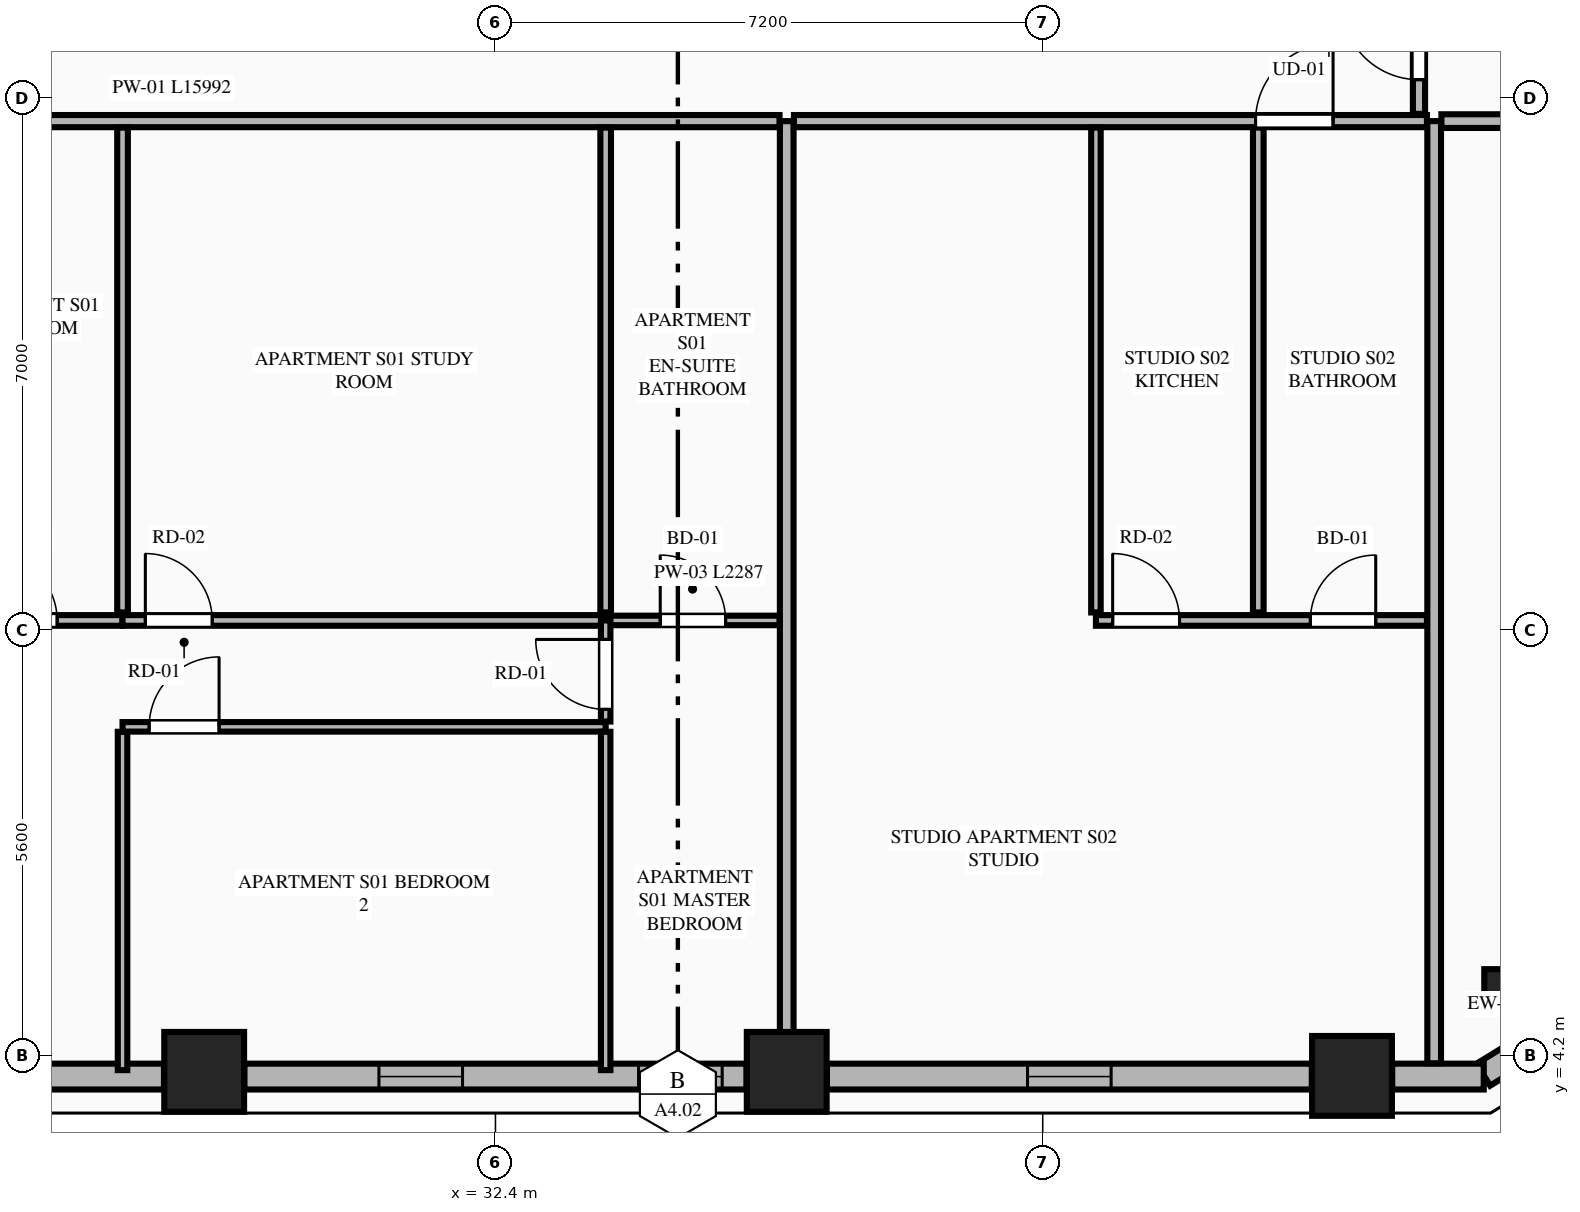
"""IFC4 building model, lengths in metres.
Left out: names, types, materials, properties, quantities, classifications, styles, units other than length and angle.
Written with IfcOpenShell. Run it as: python <this file> out.ifc"""

import sys

from ifc_helpers import new_model, si_unit, direction, frame, frame_2d, origin, origin_2d, place, context, subcontext, project, spatial, rectangle, extrude, element, fill, save


model = new_model("IFC4")
c1 = context("Model", 3, precision=1e-05, world=origin(), true_north=direction((0.0, 1.0)))
c2 = subcontext(c1, "Body", "Model", "MODEL_VIEW")
j1 = project(units=[si_unit("LENGTHUNIT", "METRE"), si_unit("PLANEANGLEUNIT", "RADIAN")], contexts=[c1])
p1 = place(None, origin())
s1 = spatial("IfcSite", under=j1, at=p1, CompositionType="ELEMENT")
p2 = place(p1, origin())
s2 = spatial("IfcBuilding", under=s1, at=p2, CompositionType="ELEMENT")
p3 = place(p2, frame((0.0, 0.0, 101.95)))
s3 = spatial("IfcBuildingStorey", under=s2, at=p3, CompositionType="ELEMENT", Elevation=101.95)
for number, where, z_axis, x_axis in (
    (1, (28.568, 3.992, 0.0), (0.0, 0.0, 1.0), (1.0, 0.0, 0.0)),
    (2, (36.232, 3.992, 0.0), (0.0, 0.0, 1.0), (1.0, 0.0, 0.0)),
    (3, (43.669, 3.939, 0.0), (0.0, 0.0, 1.0), (1.0, 0.0, 0.0)),
):
    element("IfcColumn", number, at=place(p3, frame(where, z_axis=z_axis, x_axis=x_axis)), inside=s3, PredefinedType="COLUMN", context=c2, shape_type="SweptSolid", body=[
        extrude(rectangle(XDim=1.05, YDim=1.05, at=origin_2d()), origin(), (0.0, 0.0, 1.0), 3.55),
    ])
p4 = place(p3, frame((45.659, 5.093, 0.0), z_axis=(0.0, 0.0, 1.0), x_axis=(0.865160173452, 0.501495637342, 0.0)))
e4 = element("IfcColumn", 4, at=p4, inside=s3, PredefinedType="PILASTER", context=c2, shape_type="SweptSolid", body=[
    extrude(rectangle(XDim=0.5, YDim=0.35, at=origin_2d()), origin(), (0.0, 0.0, 1.0), 3.55),
])
p5 = place(p3, frame((45.397, 3.955, 0.0), z_axis=(0.0, 0.0, 1.0), x_axis=(0.851798915137, 0.523868884523, 0.0)))
e5 = element("IfcWall", 5, at=p5, inside=s3, PredefinedType="STANDARD", context=c2, shape_type="SweptSolid", body=[
    extrude(rectangle(XDim=1.848, YDim=0.34, at=frame_2d((0.924, 0.0))), origin(), (0.0, 0.0, 1.0), 3.34),
])
p6 = place(p3, frame((21.66, 3.93, 0.0), z_axis=(0.0, 0.0, 1.0), x_axis=(1.0, 0.0, 0.0)))
e6 = element("IfcWall", 6, at=p6, inside=s3, PredefinedType="STANDARD", context=c2, shape_type="SweptSolid", body=[
    extrude(rectangle(XDim=6.379, YDim=0.34, at=frame_2d((3.189, 0.0))), origin(), (0.0, 0.0, 1.0), 2.797),
])
p7 = place(p6, frame((2.64, 0.0, 0.75)))
e7 = element("IfcOpeningElement", 7, at=p7, cuts=e6, PredefinedType="OPENING", context=c2, shape_type="SweptSolid", body=[
    extrude(rectangle(XDim=1.1, YDim=1.897, at=frame_2d((0.55, 0.948))), frame((0.0, 0.18, 0.0), z_axis=(0.0, -1.0, 0.0), x_axis=(1.0, 0.0, 0.0)), (0.0, 0.0, 1.0), 0.36),
])
p8 = place(p3, frame((29.097, 3.93, 0.0), z_axis=(0.0, 0.0, 1.0), x_axis=(1.0, 0.0, 0.0)))
e8 = element("IfcWall", 8, at=p8, inside=s3, PredefinedType="STANDARD", context=c2, shape_type="SweptSolid", body=[
    extrude(rectangle(XDim=6.606, YDim=0.34, at=frame_2d((3.303, 0.0))), origin(), (0.0, 0.0, 1.0), 2.797),
])
p9 = place(p8, frame((1.77, 0.0, 0.75)))
e9 = element("IfcOpeningElement", 9, at=p9, cuts=e8, PredefinedType="OPENING", context=c2, shape_type="SweptSolid", body=[
    extrude(rectangle(XDim=1.1, YDim=1.897, at=frame_2d((0.55, 0.948))), frame((0.0, 0.18, 0.0), z_axis=(0.0, -1.0, 0.0), x_axis=(1.0, 0.0, 0.0)), (0.0, 0.0, 1.0), 0.36),
])
p10 = place(p8, frame((5.186, 0.0, 0.75)))
e10 = element("IfcOpeningElement", 10, at=p10, cuts=e8, PredefinedType="OPENING", context=c2, shape_type="SweptSolid", body=[
    extrude(rectangle(XDim=1.1, YDim=1.897, at=frame_2d((0.55, 0.948))), frame((0.0, 0.18, 0.0), z_axis=(0.0, -1.0, 0.0), x_axis=(1.0, 0.0, 0.0)), (0.0, 0.0, 1.0), 0.36),
])
p11 = place(p3, frame((36.761, 3.93, 0.0), z_axis=(0.0, 0.0, 1.0), x_axis=(1.0, 0.0, 0.0)))
e11 = element("IfcWall", 11, at=p11, inside=s3, PredefinedType="STANDARD", context=c2, shape_type="SweptSolid", body=[
    extrude(rectangle(XDim=6.379, YDim=0.34, at=frame_2d((3.189, 0.0))), origin(), (0.0, 0.0, 1.0), 2.797),
])
p12 = place(p11, frame((2.639, 0.0, 0.75)))
e12 = element("IfcOpeningElement", 12, at=p12, cuts=e11, PredefinedType="OPENING", context=c2, shape_type="SweptSolid", body=[
    extrude(rectangle(XDim=1.1, YDim=1.897, at=frame_2d((0.55, 0.948))), frame((0.0, 0.18, 0.0), z_axis=(0.0, -1.0, 0.0), x_axis=(1.0, 0.0, 0.0)), (0.0, 0.0, 1.0), 0.36),
])
p13 = place(p3, frame((44.198, 3.93, 0.0), z_axis=(0.0, 0.0, 1.0), x_axis=(1.0, 0.0, 0.0)))
e13 = element("IfcWall", 13, at=p13, inside=s3, PredefinedType="STANDARD", context=c2, shape_type="SweptSolid", body=[
    extrude(rectangle(XDim=1.204, YDim=0.34, at=frame_2d((0.602, 0.0))), origin(), (0.0, 0.0, 1.0), 3.34),
])
p14 = place(p3, frame((36.232, 4.105, 0.0), z_axis=(0.0, 0.0, 1.0), x_axis=(0.0, 1.0, 0.0)))
e14 = element("IfcWall", 14, at=p14, inside=s3, PredefinedType="PARTITIONING", context=c2, shape_type="SweptSolid", body=[
    extrude(rectangle(XDim=12.395, YDim=0.18, at=frame_2d((6.198, 0.0))), origin(), (0.0, 0.0, 1.0), 2.722),
])
p15 = place(p3, frame((44.75, 4.105, 0.0), z_axis=(0.0, 0.0, 1.0), x_axis=(0.0, 1.0, 0.0)))
e15 = element("IfcWall", 15, at=p15, inside=s3, PredefinedType="PARTITIONING", context=c2, shape_type="SweptSolid", body=[
    extrude(rectangle(XDim=12.395, YDim=0.18, at=frame_2d((6.198, 0.0))), origin(), (0.0, 0.0, 1.0), 3.34),
])
p16 = place(p3, frame((20.145, 16.5, 0.0), z_axis=(0.0, 0.0, 1.0), x_axis=(1.0, 0.0, 0.0)))
e16 = element("IfcWall", 16, at=p16, inside=s3, PredefinedType="PARTITIONING", context=c2, shape_type="SweptSolid", body=[
    extrude(rectangle(XDim=15.992, YDim=0.16, at=frame_2d((7.996, 0.0))), origin(), (0.0, 0.0, 1.0), 3.34),
])
p17 = place(p16, frame((0.405, 0.0, 0.0)))
e17 = element("IfcOpeningElement", 17, at=p17, cuts=e16, PredefinedType="OPENING", context=c2, shape_type="SweptSolid", body=[
    extrude(rectangle(XDim=1.35, YDim=2.35, at=frame_2d((0.675, 1.175))), frame((0.0, 0.09, 0.0), z_axis=(0.0, -1.0, 0.0), x_axis=(1.0, 0.0, 0.0)), (0.0, 0.0, 1.0), 0.18),
])
p18 = place(p3, frame((22.1, 9.931, 0.0), z_axis=(0.0, 0.0, 1.0), x_axis=(1.0, 0.0, 0.0)))
e18 = element("IfcWall", 18, at=p18, inside=s3, PredefinedType="PLUMBINGWALL", context=c2, shape_type="SweptSolid", body=[
    extrude(rectangle(XDim=5.394, YDim=0.14, at=frame_2d((2.697, 0.0))), origin(), (0.0, 0.0, 1.0), 3.34),
])
p19 = place(p18, frame((3.674, 0.0, 0.0)))
e19 = element("IfcOpeningElement", 19, at=p19, cuts=e18, PredefinedType="OPENING", context=c2, shape_type="SweptSolid", body=[
    extrude(rectangle(XDim=0.86, YDim=2.1, at=frame_2d((0.43, 1.05))), frame((0.0, 0.08, 0.0), z_axis=(0.0, -1.0, 0.0), x_axis=(1.0, 0.0, 0.0)), (0.0, 0.0, 1.0), 0.16),
])
p20 = place(p18, frame((0.26, 0.0, 0.0)))
e20 = element("IfcOpeningElement", 20, at=p20, cuts=e18, PredefinedType="OPENING", context=c2, shape_type="SweptSolid", body=[
    extrude(rectangle(XDim=0.88, YDim=2.15, at=frame_2d((0.44, 1.075))), frame((0.0, 0.08, 0.0), z_axis=(0.0, -1.0, 0.0), x_axis=(1.0, 0.0, 0.0)), (0.0, 0.0, 1.0), 0.16),
])
p21 = place(p3, frame((27.494, 9.931, 0.0), z_axis=(0.0, 0.0, 1.0), x_axis=(1.0, 0.0, 0.0)))
e21 = element("IfcWall", 21, at=p21, inside=s3, PredefinedType="PLUMBINGWALL", context=c2, shape_type="SweptSolid", body=[
    extrude(rectangle(XDim=6.356, YDim=0.14, at=frame_2d((3.178, 0.0))), origin(), (0.0, 0.0, 1.0), 3.34),
])
p22 = place(p21, frame((0.3, 0.0, 0.0)))
e22 = element("IfcOpeningElement", 22, at=p22, cuts=e21, PredefinedType="OPENING", context=c2, shape_type="SweptSolid", body=[
    extrude(rectangle(XDim=0.88, YDim=2.15, at=frame_2d((0.44, 1.075))), frame((0.0, 0.08, 0.0), z_axis=(0.0, -1.0, 0.0), x_axis=(1.0, 0.0, 0.0)), (0.0, 0.0, 1.0), 0.16),
])
p23 = place(p3, frame((33.85, 9.931, 0.0), z_axis=(0.0, 0.0, 1.0), x_axis=(1.0, 0.0, 0.0)))
e23 = element("IfcWall", 23, at=p23, inside=s3, PredefinedType="PARTITIONING", context=c2, shape_type="SweptSolid", body=[
    extrude(rectangle(XDim=2.287, YDim=0.125, at=frame_2d((1.144, 0.0))), origin(), (0.0, 0.0, 1.0), 3.34),
])
p24 = place(p23, frame((0.718, 0.0, 0.0)))
e24 = element("IfcOpeningElement", 24, at=p24, cuts=e23, PredefinedType="OPENING", context=c2, shape_type="SweptSolid", body=[
    extrude(rectangle(XDim=0.86, YDim=2.1, at=frame_2d((0.43, 1.05))), frame((0.0, 0.073, 0.0), z_axis=(0.0, -1.0, 0.0), x_axis=(1.0, 0.0, 0.0)), (0.0, 0.0, 1.0), 0.145),
])
p25 = place(p3, frame((27.494, 4.015, 0.0), z_axis=(0.0, 0.0, 1.0), x_axis=(0.0, 1.0, 0.0)))
e25 = element("IfcWall", 25, at=p25, inside=s3, PredefinedType="PARTITIONING", context=c2, shape_type="SweptSolid", body=[
    extrude(rectangle(XDim=4.451, YDim=0.125, at=frame_2d((2.226, 0.0))), origin(), (0.0, 0.0, 1.0), 3.34),
])
p26 = place(p3, frame((27.494, 8.531, 0.0), z_axis=(0.0, 0.0, 1.0), x_axis=(1.0, 0.0, 0.0)))
e26 = element("IfcWall", 26, at=p26, inside=s3, PredefinedType="PARTITIONING", context=c2, shape_type="SweptSolid", body=[
    extrude(rectangle(XDim=6.356, YDim=0.125, at=frame_2d((3.178, 0.0))), origin(), (0.0, 0.0, 1.0), 3.34),
])
p27 = place(p26, frame((0.35, 0.0, 0.0)))
e27 = element("IfcOpeningElement", 27, at=p27, cuts=e26, PredefinedType="OPENING", context=c2, shape_type="SweptSolid", body=[
    extrude(rectangle(XDim=0.92, YDim=2.15, at=frame_2d((0.46, 1.075))), frame((0.0, 0.073, 0.0), z_axis=(0.0, -1.0, 0.0), x_axis=(1.0, 0.0, 0.0)), (0.0, 0.0, 1.0), 0.145),
])
p28 = place(p3, frame((33.85, 8.601, 0.0), z_axis=(0.0, 0.0, 1.0), x_axis=(0.0, 1.0, 0.0)))
e28 = element("IfcWall", 28, at=p28, inside=s3, PredefinedType="PARTITIONING", context=c2, shape_type="SweptSolid", body=[
    extrude(rectangle(XDim=1.33, YDim=0.125, at=frame_2d((0.665, 0.0))), origin(), (0.0, 0.0, 1.0), 3.34),
])
p29 = place(p28, frame((0.16, 0.0, 0.0)))
e29 = element("IfcOpeningElement", 29, at=p29, cuts=e28, PredefinedType="OPENING", context=c2, shape_type="SweptSolid", body=[
    extrude(rectangle(XDim=0.92, YDim=2.15, at=frame_2d((0.46, 1.075))), frame((0.0, 0.073, 0.0), z_axis=(0.0, -1.0, 0.0), x_axis=(1.0, 0.0, 0.0)), (0.0, 0.0, 1.0), 0.145),
])
for number, where, z_axis, x_axis in (
    (30, (27.494, 10.036, 0.0), (0.0, 0.0, 1.0), (0.0, 1.0, 0.0)),
    (31, (33.85, 10.036, 0.0), (0.0, 0.0, 1.0), (0.0, 1.0, 0.0)),
):
    element("IfcWall", number, at=place(p3, frame(where, z_axis=z_axis, x_axis=x_axis)), inside=s3, PredefinedType="PLUMBINGWALL", context=c2, shape_type="SweptSolid", body=[
        extrude(rectangle(XDim=6.379, YDim=0.14, at=frame_2d((3.189, 0.0))), origin(), (0.0, 0.0, 1.0), 3.34),
    ])
p30 = place(p3, frame((33.85, 4.015, 0.0), z_axis=(0.0, 0.0, 1.0), x_axis=(0.0, 1.0, 0.0)))
e32 = element("IfcWall", 32, at=p30, inside=s3, PredefinedType="PARTITIONING", context=c2, shape_type="SweptSolid", body=[
    extrude(rectangle(XDim=4.451, YDim=0.125, at=frame_2d((2.226, 0.0))), origin(), (0.0, 0.0, 1.0), 3.34),
])
p31 = place(p3, frame((36.327, 16.5, 0.0), z_axis=(0.0, 0.0, 1.0), x_axis=(1.0, 0.0, 0.0)))
e33 = element("IfcWall", 33, at=p31, inside=s3, PredefinedType="PARTITIONING", context=c2, shape_type="SweptSolid", body=[
    extrude(rectangle(XDim=8.328, YDim=0.16, at=frame_2d((4.164, 0.0))), origin(), (0.0, 0.0, 1.0), 3.34),
])
p32 = place(p31, frame((6.073, 0.0, 0.0)))
e34 = element("IfcOpeningElement", 34, at=p32, cuts=e33, PredefinedType="OPENING", context=c2, shape_type="SweptSolid", body=[
    extrude(rectangle(XDim=1.02, YDim=2.25, at=frame_2d((0.51, 1.125))), frame((0.0, 0.09, 0.0), z_axis=(0.0, -1.0, 0.0), x_axis=(1.0, 0.0, 0.0)), (0.0, 0.0, 1.0), 0.18),
])
p33 = place(p3, frame((40.3, 10.036, 0.0), z_axis=(0.0, 0.0, 1.0), x_axis=(0.0, 1.0, 0.0)))
e35 = element("IfcWall", 35, at=p33, inside=s3, PredefinedType="PARTITIONING", context=c2, shape_type="SweptSolid", body=[
    extrude(rectangle(XDim=6.379, YDim=0.125, at=frame_2d((3.189, 0.0))), origin(), (0.0, 0.0, 1.0), 3.34),
])
p34 = place(p3, frame((40.3, 9.931, 0.0), z_axis=(0.0, 0.0, 1.0), x_axis=(1.0, 0.0, 0.0)))
e36 = element("IfcWall", 36, at=p34, inside=s3, PredefinedType="PLUMBINGWALL", context=c2, shape_type="SweptSolid", body=[
    extrude(rectangle(XDim=4.355, YDim=0.14, at=frame_2d((2.177, 0.0))), origin(), (0.0, 0.0, 1.0), 3.34),
])
p35 = place(p34, frame((2.821, 0.0, 0.0)))
e37 = element("IfcOpeningElement", 37, at=p35, cuts=e36, PredefinedType="OPENING", context=c2, shape_type="SweptSolid", body=[
    extrude(rectangle(XDim=0.86, YDim=2.1, at=frame_2d((0.43, 1.05))), frame((0.0, 0.08, 0.0), z_axis=(0.0, -1.0, 0.0), x_axis=(1.0, 0.0, 0.0)), (0.0, 0.0, 1.0), 0.16),
])
p36 = place(p34, frame((0.22, 0.0, 0.0)))
e38 = element("IfcOpeningElement", 38, at=p36, cuts=e36, PredefinedType="OPENING", context=c2, shape_type="SweptSolid", body=[
    extrude(rectangle(XDim=0.88, YDim=2.15, at=frame_2d((0.44, 1.075))), frame((0.0, 0.08, 0.0), z_axis=(0.0, -1.0, 0.0), x_axis=(1.0, 0.0, 0.0)), (0.0, 0.0, 1.0), 0.16),
])
p37 = place(p3, frame((42.436, 10.036, 0.0), z_axis=(0.0, 0.0, 1.0), x_axis=(0.0, 1.0, 0.0)))
e39 = element("IfcWall", 39, at=p37, inside=s3, PredefinedType="PLUMBINGWALL", context=c2, shape_type="SweptSolid", body=[
    extrude(rectangle(XDim=6.379, YDim=0.14, at=frame_2d((3.189, 0.0))), origin(), (0.0, 0.0, 1.0), 2.722),
])
p38 = place(p3, frame((44.845, 16.5, 0.0), z_axis=(0.0, 0.0, 1.0), x_axis=(1.0, 0.0, 0.0)))
e40 = element("IfcWall", 40, at=p38, inside=s3, PredefinedType="PARTITIONING", context=c2, shape_type="SweptSolid", body=[
    extrude(rectangle(XDim=7.77, YDim=0.18, at=frame_2d((3.885, 0.0))), origin(), (0.0, 0.0, 1.0), 3.34),
])
p39 = place(p3, frame((44.55, 16.595, 0.0), z_axis=(0.0, 0.0, 1.0), x_axis=(0.0, 1.0, 0.0)))
e41 = element("IfcWall", 41, at=p39, inside=s3, PredefinedType="PARTITIONING", context=c2, shape_type="SweptSolid", body=[
    extrude(rectangle(XDim=9.586, YDim=0.16, at=frame_2d((4.793, 0.0))), origin(), (0.0, 0.0, 1.0), 3.34),
])
p40 = place(p39, frame((0.45, 0.0, 0.0)))
e42 = element("IfcOpeningElement", 42, at=p40, cuts=e41, PredefinedType="OPENING", context=c2, shape_type="SweptSolid", body=[
    extrude(rectangle(XDim=1.02, YDim=2.25, at=frame_2d((0.51, 1.125))), frame((0.0, 0.09, 0.0), z_axis=(0.0, -1.0, 0.0), x_axis=(1.0, 0.0, 0.0)), (0.0, 0.0, 1.0), 0.18),
])
p41 = place(p9, origin())
e43 = element("IfcWindow", 43, at=p41, inside=s3, PartitioningType="SINGLE_PANEL", PredefinedType="WINDOW", context=c2, shape_type="SweptSolid", body=[
    extrude(rectangle(XDim=1.1, YDim=1.897, at=frame_2d((0.55, 0.948))), frame((0.0, 0.03, 0.0), z_axis=(0.0, -1.0, 0.0), x_axis=(1.0, 0.0, 0.0)), (0.0, 0.0, 1.0), 0.06),
])
fill(e9, e43)
p42 = place(p12, origin())
e44 = element("IfcWindow", 44, at=p42, inside=s3, PartitioningType="SINGLE_PANEL", PredefinedType="WINDOW", context=c2, shape_type="SweptSolid", body=[
    extrude(rectangle(XDim=1.1, YDim=1.897, at=frame_2d((0.55, 0.948))), frame((0.0, 0.03, 0.0), z_axis=(0.0, -1.0, 0.0), x_axis=(1.0, 0.0, 0.0)), (0.0, 0.0, 1.0), 0.06),
])
fill(e12, e44)
p43 = place(p19, origin())
e45 = element("IfcDoor", 45, at=p43, inside=s3, OperationType="SINGLE_SWING_LEFT", PredefinedType="DOOR", context=c2, shape_type="SweptSolid", body=[
    extrude(rectangle(XDim=0.86, YDim=2.1, at=frame_2d((0.43, 1.05))), frame((0.0, 0.025, 0.0), z_axis=(0.0, -1.0, 0.0), x_axis=(1.0, 0.0, 0.0)), (0.0, 0.0, 1.0), 0.05),
])
fill(e19, e45)
p44 = place(p24, origin())
e46 = element("IfcDoor", 46, at=p44, inside=s3, OperationType="SINGLE_SWING_LEFT", PredefinedType="DOOR", context=c2, shape_type="SweptSolid", body=[
    extrude(rectangle(XDim=0.86, YDim=2.1, at=frame_2d((0.43, 1.05))), frame((0.0, 0.025, 0.0), z_axis=(0.0, -1.0, 0.0), x_axis=(1.0, 0.0, 0.0)), (0.0, 0.0, 1.0), 0.05),
])
fill(e24, e46)
p45 = place(p22, origin())
e47 = element("IfcDoor", 47, at=p45, inside=s3, OperationType="SINGLE_SWING_LEFT", PredefinedType="DOOR", context=c2, shape_type="SweptSolid", body=[
    extrude(rectangle(XDim=0.88, YDim=2.15, at=frame_2d((0.44, 1.075))), frame((0.0, 0.025, 0.0), z_axis=(0.0, -1.0, 0.0), x_axis=(1.0, 0.0, 0.0)), (0.0, 0.0, 1.0), 0.05),
])
fill(e22, e47)
p46 = place(p27, origin())
e48 = element("IfcDoor", 48, at=p46, inside=s3, OperationType="SINGLE_SWING_RIGHT", PredefinedType="DOOR", context=c2, shape_type="SweptSolid", body=[
    extrude(rectangle(XDim=0.92, YDim=2.15, at=frame_2d((0.46, 1.075))), frame((0.0, 0.025, 0.0), z_axis=(0.0, -1.0, 0.0), x_axis=(1.0, 0.0, 0.0)), (0.0, 0.0, 1.0), 0.05),
])
fill(e27, e48)
p47 = place(p29, origin())
e49 = element("IfcDoor", 49, at=p47, inside=s3, OperationType="SINGLE_SWING_RIGHT", PredefinedType="DOOR", context=c2, shape_type="SweptSolid", body=[
    extrude(rectangle(XDim=0.92, YDim=2.15, at=frame_2d((0.46, 1.075))), frame((0.0, 0.025, 0.0), z_axis=(0.0, -1.0, 0.0), x_axis=(1.0, 0.0, 0.0)), (0.0, 0.0, 1.0), 0.05),
])
fill(e29, e49)
p48 = place(p35, origin())
e50 = element("IfcDoor", 50, at=p48, inside=s3, OperationType="SINGLE_SWING_RIGHT", PredefinedType="DOOR", context=c2, shape_type="SweptSolid", body=[
    extrude(rectangle(XDim=0.86, YDim=2.1, at=frame_2d((0.43, 1.05))), frame((0.0, 0.025, 0.0), z_axis=(0.0, -1.0, 0.0), x_axis=(1.0, 0.0, 0.0)), (0.0, 0.0, 1.0), 0.05),
])
fill(e37, e50)
p49 = place(p32, origin())
e51 = element("IfcDoor", 51, at=p49, inside=s3, OperationType="SINGLE_SWING_RIGHT", PredefinedType="DOOR", context=c2, shape_type="SweptSolid", body=[
    extrude(rectangle(XDim=1.02, YDim=2.25, at=frame_2d((0.51, 1.125))), frame((0.0, 0.025, 0.0), z_axis=(0.0, -1.0, 0.0), x_axis=(1.0, 0.0, 0.0)), (0.0, 0.0, 1.0), 0.05),
])
fill(e34, e51)
p50 = place(p36, origin())
e52 = element("IfcDoor", 52, at=p50, inside=s3, OperationType="SINGLE_SWING_LEFT", PredefinedType="DOOR", context=c2, shape_type="SweptSolid", body=[
    extrude(rectangle(XDim=0.88, YDim=2.15, at=frame_2d((0.44, 1.075))), frame((0.0, 0.025, 0.0), z_axis=(0.0, -1.0, 0.0), x_axis=(1.0, 0.0, 0.0)), (0.0, 0.0, 1.0), 0.05),
])
fill(e38, e52)
p51 = place(p40, origin())
e53 = element("IfcDoor", 53, at=p51, inside=s3, OperationType="SINGLE_SWING_RIGHT", PredefinedType="DOOR", context=c2, shape_type="SweptSolid", body=[
    extrude(rectangle(XDim=1.02, YDim=2.25, at=frame_2d((0.51, 1.125))), frame((0.0, 0.025, 0.0), z_axis=(0.0, -1.0, 0.0), x_axis=(1.0, 0.0, 0.0)), (0.0, 0.0, 1.0), 0.05),
])
fill(e42, e53)
p52 = place(p10, origin())
e54 = element("IfcWindow", 54, at=p52, inside=s3, PartitioningType="SINGLE_PANEL", PredefinedType="WINDOW", context=c2, shape_type="SweptSolid", body=[
    extrude(rectangle(XDim=1.1, YDim=1.897, at=frame_2d((0.55, 0.948))), frame((0.0, 0.03, 0.0), z_axis=(0.0, -1.0, 0.0), x_axis=(1.0, 0.0, 0.0)), (0.0, 0.0, 1.0), 0.06),
])
fill(e10, e54)
save(model, sys.argv[1])
